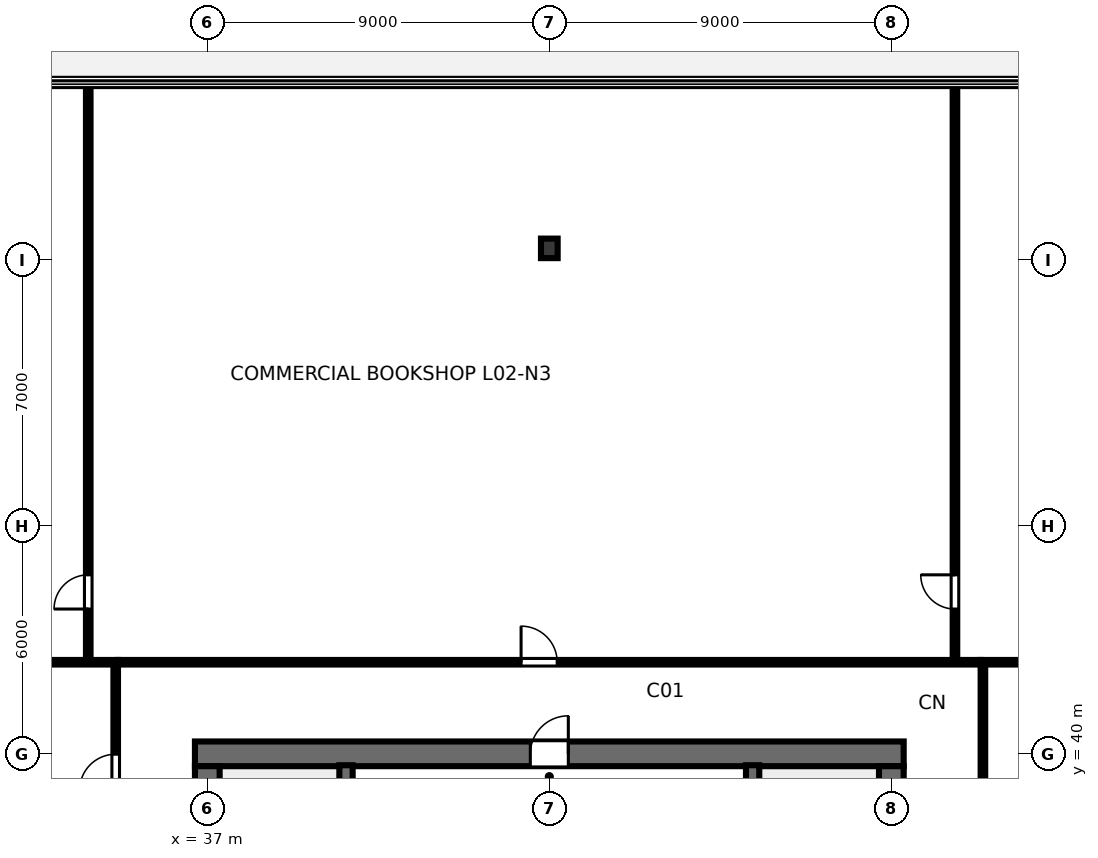
"""IFC4 building model, lengths in metres.
Left out: names, types, materials, properties, quantities, classifications, styles, units other than length and angle.
Written with IfcOpenShell. Run it as: python <this file> out.ifc"""

import sys

from ifc_helpers import new_model, si_unit, direction, frame, frame_2d, origin, origin_2d, place, context, subcontext, project, spatial, rectangle, i_section, extrude, element, fill, save


model = new_model("IFC4")
c1 = context("Model", 3, precision=1e-05, world=origin(), true_north=direction((0.0, 1.0)))
c2 = subcontext(c1, "Body", "Model", "MODEL_VIEW")
j1 = project(units=[si_unit("LENGTHUNIT", "METRE"), si_unit("PLANEANGLEUNIT", "RADIAN")], contexts=[c1])
p1 = place(None, origin())
s1 = spatial("IfcSite", under=j1, at=p1, CompositionType="ELEMENT")
p2 = place(p1, origin())
s2 = spatial("IfcBuilding", under=s1, at=p2, CompositionType="ELEMENT")
p3 = place(p2, frame((0.0, 0.0, 9.5)))
s3 = spatial("IfcBuildingStorey", under=s2, at=p3, CompositionType="ELEMENT", Elevation=9.5)
p4 = place(p3, frame((36.675, 40.0, 0.0), z_axis=(0.0, 0.0, 1.0), x_axis=(1.0, 0.0, 0.0)))
e1 = element("IfcWall", 1, at=p4, inside=s3, PredefinedType="SHEAR", context=c2, shape_type="SweptSolid", body=[
    extrude(rectangle(XDim=18.65, YDim=0.65, at=frame_2d((9.325, 0.0))), origin(), (0.0, 0.0, 1.0), 4.22),
])
p5 = place(p4, frame((8.825, 0.0, 0.0)))
e2 = element("IfcOpeningElement", 2, at=p5, cuts=e1, PredefinedType="OPENING", context=c2, shape_type="SweptSolid", body=[
    extrude(rectangle(XDim=1.0, YDim=2.15, at=frame_2d((0.5, 1.075))), frame((0.0, 0.335, 0.0), z_axis=(0.0, -1.0, 0.0), x_axis=(1.0, 0.0, 0.0)), (0.0, 0.0, 1.0), 0.67),
])
p6 = place(p3, frame((37.0, 24.325, 0.0), z_axis=(0.0, 0.0, 1.0), x_axis=(0.0, 1.0, 0.0)))
e3 = element("IfcWall", 3, at=p6, inside=s3, PredefinedType="SHEAR", context=c2, shape_type="SweptSolid", body=[
    extrude(rectangle(XDim=15.35, YDim=0.65, at=frame_2d((7.675, 0.0))), origin(), (0.0, 0.0, 1.0), 4.22),
])
p7 = place(p6, frame((5.2, 0.0, 0.0)))
e4 = element("IfcOpeningElement", 4, at=p7, cuts=e3, PredefinedType="OPENING", context=c2, shape_type="SweptSolid", body=[
    extrude(rectangle(XDim=1.15, YDim=2.15, at=frame_2d((0.575, 1.075))), frame((0.0, 0.335, 0.0), z_axis=(0.0, -1.0, 0.0), x_axis=(1.0, 0.0, 0.0)), (0.0, 0.0, 1.0), 0.67),
])
p8 = place(p3, frame((55.0, 24.325, 0.0), z_axis=(0.0, 0.0, 1.0), x_axis=(0.0, 1.0, 0.0)))
e5 = element("IfcWall", 5, at=p8, inside=s3, PredefinedType="SHEAR", context=c2, shape_type="SweptSolid", body=[
    extrude(rectangle(XDim=15.35, YDim=0.65, at=frame_2d((7.675, 0.0))), origin(), (0.0, 0.0, 1.0), 4.22),
])
p9 = place(p8, frame((5.2, 0.0, 0.0)))
e6 = element("IfcOpeningElement", 6, at=p9, cuts=e5, PredefinedType="OPENING", context=c2, shape_type="SweptSolid", body=[
    extrude(rectangle(XDim=1.15, YDim=2.15, at=frame_2d((0.575, 1.075))), frame((0.0, 0.335, 0.0), z_axis=(0.0, -1.0, 0.0), x_axis=(1.0, 0.0, 0.0)), (0.0, 0.0, 1.0), 0.67),
])
p10 = place(p3, frame((46.0, 53.3, 0.0), z_axis=(0.0, 0.0, 1.0), x_axis=(1.0, 0.0, 0.0)))
e7 = element("IfcColumn", 7, at=p10, inside=s3, PredefinedType="COLUMN", context=c2, shape_type="SweptSolid", body=[
    extrude(i_section(OverallWidth=0.439, OverallDepth=0.514, WebThickness=0.06, FlangeThickness=0.097, FilletRadius=0.025, at=origin_2d()), origin(), (0.0, 0.0, 1.0), 4.208),
])
for number, where, z_axis, x_axis in (
    (8, (40.65, 32.0, 0.0), (0.0, 0.0, 1.0), (0.0, 1.0, 0.0)),
    (9, (51.35, 32.0, 0.0), (0.0, 0.0, 1.0), (0.0, 1.0, 0.0)),
):
    element("IfcWall", number, at=place(p3, frame(where, z_axis=z_axis, x_axis=x_axis)), inside=s3, PredefinedType="SHEAR", context=c2, shape_type="SweptSolid", body=[
        extrude(rectangle(XDim=7.7, YDim=0.35, at=frame_2d((3.85, 0.0))), origin(), (0.0, 0.0, 1.0), 4.5),
    ])
p11 = place(p3, frame((33.867, 42.41, 0.0), z_axis=(0.0, 0.0, 1.0), x_axis=(0.0, 1.0, 0.0)))
e10 = element("IfcWall", 10, at=p11, inside=s3, PredefinedType="PARTITIONING", context=c2, shape_type="SweptSolid", body=[
    extrude(rectangle(XDim=15.21, YDim=0.12, at=frame_2d((7.605, 0.0))), origin(), (0.0, 0.0, 1.0), 3.31),
])
p12 = place(p11, frame((1.4, 0.0, 0.0)))
e11 = element("IfcOpeningElement", 11, at=p12, cuts=e10, PredefinedType="OPENING", context=c2, shape_type="SweptSolid", body=[
    extrude(rectangle(XDim=0.9, YDim=2.15, at=frame_2d((0.45, 1.075))), frame((0.0, 0.07, 0.0), z_axis=(0.0, -1.0, 0.0), x_axis=(1.0, 0.0, 0.0)), (0.0, 0.0, 1.0), 0.14),
])
p13 = place(p3, frame((56.674, 42.41, 0.0), z_axis=(0.0, 0.0, 1.0), x_axis=(0.0, 1.0, 0.0)))
e12 = element("IfcWall", 12, at=p13, inside=s3, PredefinedType="PARTITIONING", context=c2, shape_type="SweptSolid", body=[
    extrude(rectangle(XDim=15.21, YDim=0.12, at=frame_2d((7.605, 0.0))), origin(), (0.0, 0.0, 1.0), 3.31),
])
p14 = place(p13, frame((1.4, 0.0, 0.0)))
e13 = element("IfcOpeningElement", 13, at=p14, cuts=e12, PredefinedType="OPENING", context=c2, shape_type="SweptSolid", body=[
    extrude(rectangle(XDim=0.9, YDim=2.15, at=frame_2d((0.45, 1.075))), frame((0.0, 0.07, 0.0), z_axis=(0.0, -1.0, 0.0), x_axis=(1.0, 0.0, 0.0)), (0.0, 0.0, 1.0), 0.14),
])
p15 = place(p3, frame((34.65, 42.41, 0.0), z_axis=(0.0, 0.0, 1.0), x_axis=(1.0, 0.0, 0.0)))
e14 = element("IfcWall", 14, at=p15, inside=s3, PredefinedType="PARTITIONING", context=c2, shape_type="SweptSolid", body=[
    extrude(rectangle(XDim=22.7, YDim=0.12, at=frame_2d((11.35, 0.0))), origin(), (0.0, 0.0, 1.0), 3.31),
])
p16 = place(p15, frame((10.607, 0.0, 0.0)))
e15 = element("IfcOpeningElement", 15, at=p16, cuts=e14, PredefinedType="OPENING", context=c2, shape_type="SweptSolid", body=[
    extrude(rectangle(XDim=0.95, YDim=2.15, at=frame_2d((0.475, 1.075))), frame((0.0, 0.07, 0.0), z_axis=(0.0, -1.0, 0.0), x_axis=(1.0, 0.0, 0.0)), (0.0, 0.0, 1.0), 0.14),
])
p17 = place(p3, frame((34.59, 21.65, 0.0), z_axis=(0.0, 0.0, 1.0), x_axis=(0.0, 1.0, 0.0)))
e16 = element("IfcWall", 16, at=p17, inside=s3, PredefinedType="PARTITIONING", context=c2, shape_type="SweptSolid", body=[
    extrude(rectangle(XDim=20.7, YDim=0.12, at=frame_2d((10.35, 0.0))), origin(), (0.0, 0.0, 1.0), 3.31),
])
p18 = place(p17, frame((2.751, 0.0, 0.0)))
e17 = element("IfcOpeningElement", 17, at=p18, cuts=e16, PredefinedType="OPENING", context=c2, shape_type="SweptSolid", body=[
    extrude(rectangle(XDim=0.95, YDim=2.15, at=frame_2d((0.475, 1.075))), frame((0.0, 0.07, 0.0), z_axis=(0.0, -1.0, 0.0), x_axis=(1.0, 0.0, 0.0)), (0.0, 0.0, 1.0), 0.14),
])
p19 = place(p17, frame((10.266, 0.0, 0.0)))
e18 = element("IfcOpeningElement", 18, at=p19, cuts=e16, PredefinedType="OPENING", context=c2, shape_type="SweptSolid", body=[
    extrude(rectangle(XDim=0.95, YDim=2.15, at=frame_2d((0.475, 1.075))), frame((0.0, 0.07, 0.0), z_axis=(0.0, -1.0, 0.0), x_axis=(1.0, 0.0, 0.0)), (0.0, 0.0, 1.0), 0.14),
])
p20 = place(p17, frame((17.39, 0.0, 0.0)))
e19 = element("IfcOpeningElement", 19, at=p20, cuts=e16, PredefinedType="OPENING", context=c2, shape_type="SweptSolid", body=[
    extrude(rectangle(XDim=0.95, YDim=2.15, at=frame_2d((0.475, 1.075))), frame((0.0, 0.07, 0.0), z_axis=(0.0, -1.0, 0.0), x_axis=(1.0, 0.0, 0.0)), (0.0, 0.0, 1.0), 0.14),
])
p21 = place(p3, frame((57.41, 21.65, 0.0), z_axis=(0.0, 0.0, 1.0), x_axis=(0.0, 1.0, 0.0)))
e20 = element("IfcWall", 20, at=p21, inside=s3, PredefinedType="PARTITIONING", context=c2, shape_type="SweptSolid", body=[
    extrude(rectangle(XDim=20.7, YDim=0.12, at=frame_2d((10.35, 0.0))), origin(), (0.0, 0.0, 1.0), 3.31),
])
p22 = place(p21, frame((9.875, 0.0, 0.0)))
e21 = element("IfcOpeningElement", 21, at=p22, cuts=e20, PredefinedType="OPENING", context=c2, shape_type="SweptSolid", body=[
    extrude(rectangle(XDim=0.95, YDim=2.15, at=frame_2d((0.475, 1.075))), frame((0.0, 0.07, 0.0), z_axis=(0.0, -1.0, 0.0), x_axis=(1.0, 0.0, 0.0)), (0.0, 0.0, 1.0), 0.14),
])
for number, where, z_axis, x_axis in (
    (22, (34.65, 42.41, 0.0), (0.0, 0.0, 1.0), (-1.0, 0.0, 0.0)),
    (23, (57.35, 42.41, 0.0), (0.0, 0.0, 1.0), (1.0, 0.0, 0.0)),
):
    element("IfcWall", number, at=place(p3, frame(where, z_axis=z_axis, x_axis=x_axis)), inside=s3, PredefinedType="PARTITIONING", context=c2, shape_type="SweptSolid", body=[
        extrude(rectangle(XDim=25.47, YDim=0.12, at=frame_2d((12.735, 0.0))), origin(), (0.0, 0.0, 1.0), 3.31),
    ])
p23 = place(p5, origin())
e24 = element("IfcDoor", 24, at=p23, inside=s3, OperationType="SINGLE_SWING_RIGHT", PredefinedType="DOOR", context=c2, shape_type="SweptSolid", body=[
    extrude(rectangle(XDim=1.0, YDim=2.15, at=frame_2d((0.5, 1.075))), frame((0.0, 0.025, 0.0), z_axis=(0.0, -1.0, 0.0), x_axis=(1.0, 0.0, 0.0)), (0.0, 0.0, 1.0), 0.05),
])
fill(e2, e24)
p24 = place(p12, origin())
e25 = element("IfcDoor", 25, at=p24, inside=s3, OperationType="SINGLE_SWING_LEFT", PredefinedType="DOOR", context=c2, shape_type="SweptSolid", body=[
    extrude(rectangle(XDim=0.9, YDim=2.15, at=frame_2d((0.45, 1.075))), frame((0.0, 0.025, 0.0), z_axis=(0.0, -1.0, 0.0), x_axis=(1.0, 0.0, 0.0)), (0.0, 0.0, 1.0), 0.05),
])
fill(e11, e25)
p25 = place(p14, origin())
e26 = element("IfcDoor", 26, at=p25, inside=s3, OperationType="SINGLE_SWING_RIGHT", PredefinedType="DOOR", context=c2, shape_type="SweptSolid", body=[
    extrude(rectangle(XDim=0.9, YDim=2.15, at=frame_2d((0.45, 1.075))), frame((0.0, 0.025, 0.0), z_axis=(0.0, -1.0, 0.0), x_axis=(1.0, 0.0, 0.0)), (0.0, 0.0, 1.0), 0.05),
])
fill(e13, e26)
p26 = place(p16, origin())
e27 = element("IfcDoor", 27, at=p26, inside=s3, OperationType="SINGLE_SWING_LEFT", PredefinedType="DOOR", context=c2, shape_type="SweptSolid", body=[
    extrude(rectangle(XDim=0.95, YDim=2.15, at=frame_2d((0.475, 1.075))), frame((0.0, 0.025, 0.0), z_axis=(0.0, -1.0, 0.0), x_axis=(1.0, 0.0, 0.0)), (0.0, 0.0, 1.0), 0.05),
])
fill(e15, e27)
p27 = place(p20, origin())
e28 = element("IfcDoor", 28, at=p27, inside=s3, OperationType="SINGLE_SWING_LEFT", PredefinedType="DOOR", context=c2, shape_type="SweptSolid", body=[
    extrude(rectangle(XDim=0.95, YDim=2.15, at=frame_2d((0.475, 1.075))), frame((0.0, 0.025, 0.0), z_axis=(0.0, -1.0, 0.0), x_axis=(1.0, 0.0, 0.0)), (0.0, 0.0, 1.0), 0.05),
])
fill(e19, e28)
save(model, sys.argv[1])
